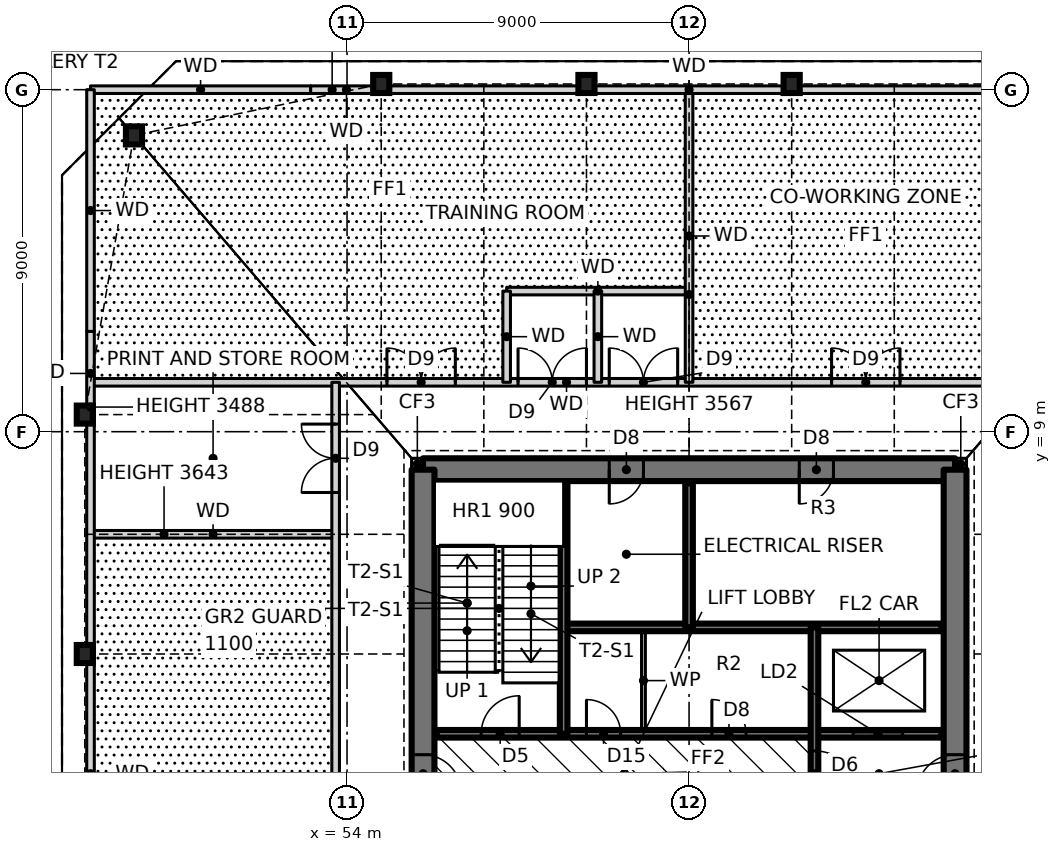
"""IFC4 building model, lengths in metres.
Left out: names, types, materials, properties, quantities, classifications, styles, units other than length and angle.
Written with IfcOpenShell. Run it as: python <this file> out.ifc"""

import sys

from ifc_helpers import new_model, si_unit, direction, frame, frame_2d, origin, origin_2d, place, context, subcontext, project, spatial, rectangle, i_section, extrude, element, fill, save


model = new_model("IFC4")
c1 = context("Model", 3, precision=1e-05, world=origin(), true_north=direction((0.0, 1.0)))
c2 = subcontext(c1, "Body", "Model", "MODEL_VIEW")
j1 = project(units=[si_unit("LENGTHUNIT", "METRE"), si_unit("PLANEANGLEUNIT", "RADIAN")], contexts=[c1])
p1 = place(None, origin())
s1 = spatial("IfcSite", under=j1, at=p1, CompositionType="ELEMENT")
p2 = place(p1, origin())
s2 = spatial("IfcBuilding", under=s1, at=p2, CompositionType="ELEMENT")
p3 = place(p2, frame((0.0, 0.0, 6.0)))
s3 = spatial("IfcBuildingStorey", under=s2, at=p3, CompositionType="ELEMENT", Elevation=6.0)
for number, where, z_axis, x_axis in (
    (1, (65.7, 18.15, 0.0), (0.0, 0.0, 1.0), (1.0, 0.0, 0.0)),
    (2, (60.3, 18.15, 0.0), (0.0, 0.0, 1.0), (1.0, 0.0, 0.0)),
    (3, (54.9, 18.15, 0.0), (0.0, 0.0, 1.0), (1.0, 0.0, 0.0)),
    (4, (48.394, 16.797, 0.0), (0.0, 0.0, 1.0), (1.0, 0.0, 0.0)),
    (5, (47.1, 9.45, 0.0), (0.0, 0.0, 1.0), (1.0, 0.0, 0.0)),
    (6, (47.1, 3.15, 0.0), (0.0, 0.0, 1.0), (1.0, 0.0, 0.0)),
):
    element("IfcColumn", number, at=place(p3, frame(where, z_axis=z_axis, x_axis=x_axis)), inside=s3, PredefinedType="COLUMN", context=c2, shape_type="SweptSolid", body=[
        extrude(i_section(OverallWidth=0.424, OverallDepth=0.475, WebThickness=0.048, FlangeThickness=0.077, at=origin_2d()), origin(), (0.0, 0.0, 1.0), 4.5),
    ])
for number, where, z_axis, x_axis in (
    (7, (70.0, 8.15, 0.0), (0.0, 0.0, 1.0), (1.0, 0.0, 0.0)),
    (8, (55.7, 8.15, 0.0), (0.0, 0.0, 1.0), (1.0, 0.0, 0.0)),
):
    element("IfcWall", number, at=place(p3, frame(where, z_axis=z_axis, x_axis=x_axis)), inside=s3, PredefinedType="SOLIDWALL", context=c2, shape_type="SweptSolid", body=[
        extrude(rectangle(XDim=0.3, YDim=0.3, at=frame_2d((0.15, 0.0))), origin(), (0.0, 0.0, 1.0), 4.5),
    ])
p4 = place(p3, frame((70.0, 8.0, 0.0), z_axis=(0.0, 0.0, 1.0), x_axis=(-1.0, 0.0, 0.0)))
e9 = element("IfcWall", 9, at=p4, inside=s3, PredefinedType="SHEAR", context=c2, shape_type="SweptSolid", body=[
    extrude(rectangle(XDim=14.0, YDim=0.6, at=frame_2d((7.0, 0.0))), origin(), (0.0, 0.0, 1.0), 4.5),
])
p5 = place(p4, frame((8.2, 0.0, 0.0)))
e10 = element("IfcOpeningElement", 10, at=p5, cuts=e9, PredefinedType="OPENING", context=c2, shape_type="SweptSolid", body=[
    extrude(rectangle(XDim=0.9, YDim=2.1, at=frame_2d((0.45, 1.05))), frame((0.0, 0.31, 0.0), z_axis=(0.0, -1.0, 0.0), x_axis=(1.0, 0.0, 0.0)), (0.0, 0.0, 1.0), 0.62),
])
p6 = place(p4, frame((3.2, 0.0, 0.0)))
e11 = element("IfcOpeningElement", 11, at=p6, cuts=e9, PredefinedType="OPENING", context=c2, shape_type="SweptSolid", body=[
    extrude(rectangle(XDim=0.9, YDim=2.1, at=frame_2d((0.45, 1.05))), frame((0.0, 0.31, 0.0), z_axis=(0.0, -1.0, 0.0), x_axis=(1.0, 0.0, 0.0)), (0.0, 0.0, 1.0), 0.62),
])
p7 = place(p3, frame((70.0, -8.0, 0.0), z_axis=(0.0, 0.0, 1.0), x_axis=(0.0, 1.0, 0.0)))
e12 = element("IfcWall", 12, at=p7, inside=s3, PredefinedType="SHEAR", context=c2, shape_type="SweptSolid", body=[
    extrude(rectangle(XDim=16.0, YDim=0.6, at=frame_2d((8.0, 0.0))), origin(), (0.0, 0.0, 1.0), 4.5),
])
p8 = place(p7, frame((7.5, 0.0, 0.0)))
e13 = element("IfcOpeningElement", 13, at=p8, cuts=e12, PredefinedType="OPENING", context=c2, shape_type="SweptSolid", body=[
    extrude(rectangle(XDim=1.0, YDim=2.1, at=frame_2d((0.5, 1.05))), frame((0.0, 0.31, 0.0), z_axis=(0.0, -1.0, 0.0), x_axis=(1.0, 0.0, 0.0)), (0.0, 0.0, 1.0), 0.62),
])
p9 = place(p3, frame((56.0, 8.0, 0.0), z_axis=(0.0, 0.0, 1.0), x_axis=(0.0, -1.0, 0.0)))
e14 = element("IfcWall", 14, at=p9, inside=s3, PredefinedType="SHEAR", context=c2, shape_type="SweptSolid", body=[
    extrude(rectangle(XDim=16.0, YDim=0.6, at=frame_2d((8.0, 0.0))), origin(), (0.0, 0.0, 1.0), 4.5),
])
p10 = place(p9, frame((7.5, 0.0, 0.0)))
e15 = element("IfcOpeningElement", 15, at=p10, cuts=e14, PredefinedType="OPENING", context=c2, shape_type="SweptSolid", body=[
    extrude(rectangle(XDim=1.0, YDim=2.1, at=frame_2d((0.5, 1.05))), frame((0.0, 0.31, 0.0), z_axis=(0.0, -1.0, 0.0), x_axis=(1.0, 0.0, 0.0)), (0.0, 0.0, 1.0), 0.62),
])
p11 = place(p3, frame((56.36, 1.05, 0.0), z_axis=(0.0, 0.0, 1.0), x_axis=(1.0, 0.0, 0.0)))
e16 = element("IfcWall", 16, at=p11, inside=s3, PredefinedType="SOLIDWALL", context=c2, shape_type="SweptSolid", body=[
    extrude(rectangle(XDim=13.28, YDim=0.2, at=frame_2d((6.64, 0.0))), origin(), (0.0, 0.0, 1.0), 4.5),
])
p12 = place(p11, frame((1.17, 0.0, 0.0)))
e17 = element("IfcOpeningElement", 17, at=p12, cuts=e16, PredefinedType="OPENING", context=c2, shape_type="SweptSolid", body=[
    extrude(rectangle(XDim=1.0, YDim=2.1, at=frame_2d((0.5, 1.05))), frame((0.0, 0.11, 0.0), z_axis=(0.0, -1.0, 0.0), x_axis=(1.0, 0.0, 0.0)), (0.0, 0.0, 1.0), 0.22),
])
p13 = place(p11, frame((7.24, 0.0, 0.0)))
e18 = element("IfcOpeningElement", 18, at=p13, cuts=e16, PredefinedType="OPENING", context=c2, shape_type="SweptSolid", body=[
    extrude(rectangle(XDim=0.9, YDim=2.1, at=frame_2d((0.45, 1.05))), frame((0.0, 0.11, 0.0), z_axis=(0.0, -1.0, 0.0), x_axis=(1.0, 0.0, 0.0)), (0.0, 0.0, 1.0), 0.22),
])
p14 = place(p11, frame((3.94, 0.0, 0.0)))
e19 = element("IfcOpeningElement", 19, at=p14, cuts=e16, PredefinedType="OPENING", context=c2, shape_type="SweptSolid", body=[
    extrude(rectangle(XDim=0.9, YDim=2.1, at=frame_2d((0.45, 1.05))), frame((0.0, 0.11, 0.0), z_axis=(0.0, -1.0, 0.0), x_axis=(1.0, 0.0, 0.0)), (0.0, 0.0, 1.0), 0.22),
])
p15 = place(p11, frame((10.96, 0.0, 0.0)))
e20 = element("IfcOpeningElement", 20, at=p15, cuts=e16, PredefinedType="OPENING", context=c2, shape_type="SweptSolid", body=[
    extrude(rectangle(XDim=1.3, YDim=2.1, at=frame_2d((0.65, 1.05))), frame((0.0, 0.11, 0.0), z_axis=(0.0, -1.0, 0.0), x_axis=(1.0, 0.0, 0.0)), (0.0, 0.0, 1.0), 0.22),
])
p16 = place(p3, frame((59.7, 3.85, 0.0), z_axis=(0.0, 0.0, 1.0), x_axis=(1.0, 0.0, 0.0)))
e21 = element("IfcWall", 21, at=p16, inside=s3, PredefinedType="SOLIDWALL", context=c2, shape_type="SweptSolid", body=[
    extrude(rectangle(XDim=9.94, YDim=0.2, at=frame_2d((4.97, 0.0))), origin(), (0.0, 0.0, 1.0), 4.5),
])
p17 = place(p3, frame((47.25, 6.3, 0.0), z_axis=(0.0, 0.0, 1.0), x_axis=(1.0, 0.0, 0.0)))
e22 = element("IfcWall", 22, at=p17, inside=s3, PredefinedType="SOLIDWALL", context=c2, shape_type="SweptSolid", body=[
    extrude(rectangle(XDim=6.45, YDim=0.2, at=frame_2d((3.225, 0.0))), origin(), (0.0, 0.0, 1.0), 3.643),
])
p18 = place(p3, frame((47.25, 10.3, 0.0), z_axis=(0.0, 0.0, 1.0), x_axis=(1.0, 0.0, 0.0)))
e23 = element("IfcWall", 23, at=p18, inside=s3, PredefinedType="SOLIDWALL", context=c2, shape_type="SweptSolid", body=[
    extrude(rectangle(XDim=25.05, YDim=0.2, at=frame_2d((12.525, 0.0))), origin(), (0.0, 0.0, 1.0), 4.25),
])
p19 = place(p18, frame((19.5, 0.0, 0.0)))
e24 = element("IfcOpeningElement", 24, at=p19, cuts=e23, PredefinedType="OPENING", context=c2, shape_type="SweptSolid", body=[
    extrude(rectangle(XDim=1.8, YDim=2.1, at=frame_2d((0.9, 1.05))), frame((0.0, 0.11, 0.0), z_axis=(0.0, -1.0, 0.0), x_axis=(1.0, 0.0, 0.0)), (0.0, 0.0, 1.0), 0.22),
])
p20 = place(p18, frame((13.65, 0.0, 0.0)))
e25 = element("IfcOpeningElement", 25, at=p20, cuts=e23, PredefinedType="OPENING", context=c2, shape_type="SweptSolid", body=[
    extrude(rectangle(XDim=1.8, YDim=2.1, at=frame_2d((0.9, 1.05))), frame((0.0, 0.11, 0.0), z_axis=(0.0, -1.0, 0.0), x_axis=(1.0, 0.0, 0.0)), (0.0, 0.0, 1.0), 0.22),
])
p21 = place(p18, frame((11.25, 0.0, 0.0)))
e26 = element("IfcOpeningElement", 26, at=p21, cuts=e23, PredefinedType="OPENING", context=c2, shape_type="SweptSolid", body=[
    extrude(rectangle(XDim=1.8, YDim=2.1, at=frame_2d((0.9, 1.05))), frame((0.0, 0.11, 0.0), z_axis=(0.0, -1.0, 0.0), x_axis=(1.0, 0.0, 0.0)), (0.0, 0.0, 1.0), 0.22),
])
p22 = place(p18, frame((7.8, 0.0, 0.0)))
e27 = element("IfcOpeningElement", 27, at=p22, cuts=e23, PredefinedType="OPENING", context=c2, shape_type="SweptSolid", body=[
    extrude(rectangle(XDim=1.8, YDim=2.1, at=frame_2d((0.9, 1.05))), frame((0.0, 0.11, 0.0), z_axis=(0.0, -1.0, 0.0), x_axis=(1.0, 0.0, 0.0)), (0.0, 0.0, 1.0), 0.22),
])
p23 = place(p3, frame((58.2, 12.7, 0.0), z_axis=(0.0, 0.0, 1.0), x_axis=(1.0, 0.0, 0.0)))
e28 = element("IfcWall", 28, at=p23, inside=s3, PredefinedType="SOLIDWALL", context=c2, shape_type="SweptSolid", body=[
    extrude(rectangle(XDim=4.8, YDim=0.2, at=frame_2d((2.4, 0.0))), origin(), (0.0, 0.0, 1.0), 4.25),
])
p24 = place(p3, frame((47.25, 18.0, 0.0), z_axis=(0.0, 0.0, 1.0), x_axis=(1.0, 0.0, 0.0)))
e29 = element("IfcWall", 29, at=p24, inside=s3, PredefinedType="SOLIDWALL", context=c2, shape_type="SweptSolid", body=[
    extrude(rectangle(XDim=5.793, YDim=0.2, at=frame_2d((2.896, 0.0))), origin(), (0.0, 0.0, 1.0), 4.25),
])
p25 = place(p3, frame((66.3, -7.64, 0.0), z_axis=(0.0, 0.0, 1.0), x_axis=(0.0, 1.0, 0.0)))
e30 = element("IfcWall", 30, at=p25, inside=s3, PredefinedType="SOLIDWALL", context=c2, shape_type="SweptSolid", body=[
    extrude(rectangle(XDim=11.49, YDim=0.2, at=frame_2d((5.745, 0.0))), origin(), (0.0, 0.0, 1.0), 4.5),
])
p26 = place(p25, frame((7.04, 0.0, 0.0)))
e31 = element("IfcOpeningElement", 31, at=p26, cuts=e30, PredefinedType="OPENING", context=c2, shape_type="SweptSolid", body=[
    extrude(rectangle(XDim=1.2, YDim=2.1, at=frame_2d((0.6, 1.05))), frame((0.0, 0.11, 0.0), z_axis=(0.0, -1.0, 0.0), x_axis=(1.0, 0.0, 0.0)), (0.0, 0.0, 1.0), 0.22),
])
p27 = place(p3, frame((63.0, 3.85, 0.0), z_axis=(0.0, 0.0, 1.0), x_axis=(0.0, 1.0, 0.0)))
e32 = element("IfcWall", 32, at=p27, inside=s3, PredefinedType="SOLIDWALL", context=c2, shape_type="SweptSolid", body=[
    extrude(rectangle(XDim=3.79, YDim=0.2, at=frame_2d((1.895, 0.0))), origin(), (0.0, 0.0, 1.0), 4.5),
])
p28 = place(p3, frame((63.0, 10.3, 0.0), z_axis=(0.0, 0.0, 1.0), x_axis=(0.0, 1.0, 0.0)))
e33 = element("IfcWall", 33, at=p28, inside=s3, PredefinedType="SOLIDWALL", context=c2, shape_type="SweptSolid", body=[
    extrude(rectangle(XDim=7.7, YDim=0.2, at=frame_2d((3.85, 0.0))), origin(), (0.0, 0.0, 1.0), 3.567),
])
p29 = place(p3, frame((61.8, 1.05, 0.0), z_axis=(0.0, 0.0, 1.0), x_axis=(0.0, 1.0, 0.0)))
e34 = element("IfcWall", 34, at=p29, inside=s3, PredefinedType="PARTITIONING", context=c2, shape_type="SweptSolid", body=[
    extrude(rectangle(XDim=2.8, YDim=0.1, at=frame_2d((1.4, 0.0))), origin(), (0.0, 0.0, 1.0), 4.3),
])
p30 = place(p3, frame((60.6, 10.3, 0.0), z_axis=(0.0, 0.0, 1.0), x_axis=(0.0, 1.0, 0.0)))
e35 = element("IfcWall", 35, at=p30, inside=s3, PredefinedType="SOLIDWALL", context=c2, shape_type="SweptSolid", body=[
    extrude(rectangle(XDim=2.4, YDim=0.2, at=frame_2d((1.2, 0.0))), origin(), (0.0, 0.0, 1.0), 4.25),
])
p31 = place(p3, frame((59.7, 1.05, 0.0), z_axis=(0.0, 0.0, 1.0), x_axis=(0.0, 1.0, 0.0)))
e36 = element("IfcWall", 36, at=p31, inside=s3, PredefinedType="SOLIDWALL", context=c2, shape_type="SweptSolid", body=[
    extrude(rectangle(XDim=6.59, YDim=0.2, at=frame_2d((3.295, 0.0))), origin(), (0.0, 0.0, 1.0), 4.5),
])
p32 = place(p3, frame((58.2, 10.3, 0.0), z_axis=(0.0, 0.0, 1.0), x_axis=(0.0, 1.0, 0.0)))
e37 = element("IfcWall", 37, at=p32, inside=s3, PredefinedType="SOLIDWALL", context=c2, shape_type="SweptSolid", body=[
    extrude(rectangle(XDim=2.4, YDim=0.2, at=frame_2d((1.2, 0.0))), origin(), (0.0, 0.0, 1.0), 4.25),
])
p33 = place(p3, frame((53.7, -18.0, 0.0), z_axis=(0.0, 0.0, 1.0), x_axis=(0.0, 1.0, 0.0)))
e38 = element("IfcWall", 38, at=p33, inside=s3, PredefinedType="SOLIDWALL", context=c2, shape_type="SweptSolid", body=[
    extrude(rectangle(XDim=28.3, YDim=0.2, at=frame_2d((14.15, 0.0))), origin(), (0.0, 0.0, 1.0), 4.25),
])
p34 = place(p33, frame((15.4, 0.0, 0.0)))
e39 = element("IfcOpeningElement", 39, at=p34, cuts=e38, PredefinedType="OPENING", context=c2, shape_type="SweptSolid", body=[
    extrude(rectangle(XDim=1.8, YDim=2.1, at=frame_2d((0.9, 1.05))), frame((0.0, 0.11, 0.0), z_axis=(0.0, -1.0, 0.0), x_axis=(1.0, 0.0, 0.0)), (0.0, 0.0, 1.0), 0.22),
])
p35 = place(p33, frame((25.4, 0.0, 0.0)))
e40 = element("IfcOpeningElement", 40, at=p35, cuts=e38, PredefinedType="OPENING", context=c2, shape_type="SweptSolid", body=[
    extrude(rectangle(XDim=1.8, YDim=2.1, at=frame_2d((0.9, 1.05))), frame((0.0, 0.11, 0.0), z_axis=(0.0, -1.0, 0.0), x_axis=(1.0, 0.0, 0.0)), (0.0, 0.0, 1.0), 0.22),
])
p36 = place(p33, frame((8.55, 0.0, 0.0)))
e41 = element("IfcOpeningElement", 41, at=p36, cuts=e38, PredefinedType="OPENING", context=c2, shape_type="SweptSolid", body=[
    extrude(rectangle(XDim=1.8, YDim=2.1, at=frame_2d((0.9, 1.05))), frame((0.0, 0.11, 0.0), z_axis=(0.0, -1.0, 0.0), x_axis=(1.0, 0.0, 0.0)), (0.0, 0.0, 1.0), 0.22),
])
p37 = place(p3, frame((53.043, 18.0, 0.0), z_axis=(0.0, 0.0, 1.0), x_axis=(1.0, 0.0, 0.0)))
e42 = element("IfcWall", 42, at=p37, inside=s3, PredefinedType="SOLIDWALL", context=c2, shape_type="SweptSolid", body=[
    extrude(rectangle(XDim=1.884, YDim=0.2, at=frame_2d((0.942, 0.0))), origin(), (0.0, 0.0, 1.0), 3.488),
])
p38 = place(p3, frame((54.927, 18.0, 0.0), z_axis=(0.0, 0.0, 1.0), x_axis=(1.0, 0.0, 0.0)))
e43 = element("IfcWall", 43, at=p38, inside=s3, PredefinedType="SOLIDWALL", context=c2, shape_type="SweptSolid", body=[
    extrude(rectangle(XDim=16.146, YDim=0.2, at=frame_2d((8.073, 0.0))), origin(), (0.0, 0.0, 1.0), 4.25),
])
p39 = place(p3, frame((47.25, -9.427, 0.0), z_axis=(0.0, 0.0, 1.0), x_axis=(0.0, 1.0, 0.0)))
e44 = element("IfcWall", 44, at=p39, inside=s3, PredefinedType="SOLIDWALL", context=c2, shape_type="SweptSolid", body=[
    extrude(rectangle(XDim=18.854, YDim=0.2, at=frame_2d((9.427, 0.0))), origin(), (0.0, 0.0, 1.0), 4.25),
])
p40 = place(p3, frame((47.25, 9.427, 0.0), z_axis=(0.0, 0.0, 1.0), x_axis=(0.0, 1.0, 0.0)))
e45 = element("IfcWall", 45, at=p40, inside=s3, PredefinedType="SOLIDWALL", context=c2, shape_type="SweptSolid", body=[
    extrude(rectangle(XDim=2.212, YDim=0.2, at=frame_2d((1.106, 0.0))), origin(), (0.0, 0.0, 1.0), 3.488),
])
p41 = place(p3, frame((47.25, 11.639, 0.0), z_axis=(0.0, 0.0, 1.0), x_axis=(0.0, 1.0, 0.0)))
e46 = element("IfcWall", 46, at=p41, inside=s3, PredefinedType="SOLIDWALL", context=c2, shape_type="SweptSolid", body=[
    extrude(rectangle(XDim=6.361, YDim=0.2, at=frame_2d((3.181, 0.0))), origin(), (0.0, 0.0, 1.0), 4.25),
])
p42 = place(p12, origin())
e47 = element("IfcDoor", 47, at=p42, inside=s3, OperationType="SINGLE_SWING_RIGHT", PredefinedType="DOOR", context=c2, shape_type="SweptSolid", body=[
    extrude(rectangle(XDim=1.0, YDim=2.1, at=frame_2d((0.5, 1.05))), frame((0.0, 0.025, 0.0), z_axis=(0.0, -1.0, 0.0), x_axis=(1.0, 0.0, 0.0)), (0.0, 0.0, 1.0), 0.05),
])
fill(e17, e47)
p43 = place(p26, frame((1.2, 0.0, 0.0), z_axis=(0.0, 0.0, 1.0), x_axis=(-1.0, 0.0, 0.0)))
e48 = element("IfcDoor", 48, at=p43, inside=s3, OperationType="SINGLE_SWING_RIGHT", PredefinedType="DOOR", context=c2, shape_type="SweptSolid", body=[
    extrude(rectangle(XDim=1.2, YDim=2.1, at=frame_2d((0.6, 1.05))), frame((0.0, 0.025, 0.0), z_axis=(0.0, -1.0, 0.0), x_axis=(1.0, 0.0, 0.0)), (0.0, 0.0, 1.0), 0.05),
])
fill(e31, e48)
p44 = place(p13, origin())
e49 = element("IfcDoor", 49, at=p44, inside=s3, OperationType="SINGLE_SWING_LEFT", PredefinedType="DOOR", context=c2, shape_type="SweptSolid", body=[
    extrude(rectangle(XDim=0.9, YDim=2.1, at=frame_2d((0.45, 1.05))), frame((0.0, 0.025, 0.0), z_axis=(0.0, -1.0, 0.0), x_axis=(1.0, 0.0, 0.0)), (0.0, 0.0, 1.0), 0.05),
])
fill(e18, e49)
p45 = place(p14, origin())
e50 = element("IfcDoor", 50, at=p45, inside=s3, OperationType="SINGLE_SWING_LEFT", PredefinedType="DOOR", context=c2, shape_type="SweptSolid", body=[
    extrude(rectangle(XDim=0.9, YDim=2.1, at=frame_2d((0.45, 1.05))), frame((0.0, 0.025, 0.0), z_axis=(0.0, -1.0, 0.0), x_axis=(1.0, 0.0, 0.0)), (0.0, 0.0, 1.0), 0.05),
])
fill(e19, e50)
p46 = place(p19, origin())
e51 = element("IfcDoor", 51, at=p46, inside=s3, OperationType="DOUBLE_DOOR_SINGLE_SWING", PredefinedType="DOOR", context=c2, shape_type="SweptSolid", body=[
    extrude(rectangle(XDim=1.8, YDim=2.1, at=frame_2d((0.9, 1.05))), frame((0.0, 0.025, 0.0), z_axis=(0.0, -1.0, 0.0), x_axis=(1.0, 0.0, 0.0)), (0.0, 0.0, 1.0), 0.05),
])
fill(e24, e51)
p47 = place(p20, origin())
e52 = element("IfcDoor", 52, at=p47, inside=s3, OperationType="DOUBLE_DOOR_SINGLE_SWING", PredefinedType="DOOR", context=c2, shape_type="SweptSolid", body=[
    extrude(rectangle(XDim=1.8, YDim=2.1, at=frame_2d((0.9, 1.05))), frame((0.0, 0.025, 0.0), z_axis=(0.0, -1.0, 0.0), x_axis=(1.0, 0.0, 0.0)), (0.0, 0.0, 1.0), 0.05),
])
fill(e25, e52)
p48 = place(p21, origin())
e53 = element("IfcDoor", 53, at=p48, inside=s3, OperationType="DOUBLE_DOOR_SINGLE_SWING", PredefinedType="DOOR", context=c2, shape_type="SweptSolid", body=[
    extrude(rectangle(XDim=1.8, YDim=2.1, at=frame_2d((0.9, 1.05))), frame((0.0, 0.025, 0.0), z_axis=(0.0, -1.0, 0.0), x_axis=(1.0, 0.0, 0.0)), (0.0, 0.0, 1.0), 0.05),
])
fill(e26, e53)
p49 = place(p22, origin())
e54 = element("IfcDoor", 54, at=p49, inside=s3, OperationType="DOUBLE_DOOR_SINGLE_SWING", PredefinedType="DOOR", context=c2, shape_type="SweptSolid", body=[
    extrude(rectangle(XDim=1.8, YDim=2.1, at=frame_2d((0.9, 1.05))), frame((0.0, 0.025, 0.0), z_axis=(0.0, -1.0, 0.0), x_axis=(1.0, 0.0, 0.0)), (0.0, 0.0, 1.0), 0.05),
])
fill(e27, e54)
p50 = place(p35, origin())
e55 = element("IfcDoor", 55, at=p50, inside=s3, OperationType="DOUBLE_DOOR_SINGLE_SWING", PredefinedType="DOOR", context=c2, shape_type="SweptSolid", body=[
    extrude(rectangle(XDim=1.8, YDim=2.1, at=frame_2d((0.9, 1.05))), frame((0.0, 0.025, 0.0), z_axis=(0.0, -1.0, 0.0), x_axis=(1.0, 0.0, 0.0)), (0.0, 0.0, 1.0), 0.05),
])
fill(e40, e55)
p51 = place(p10, origin())
e56 = element("IfcDoor", 56, at=p51, inside=s3, OperationType="SINGLE_SWING_RIGHT", PredefinedType="DOOR", context=c2, shape_type="SweptSolid", body=[
    extrude(rectangle(XDim=1.0, YDim=2.1, at=frame_2d((0.5, 1.05))), frame((0.0, 0.025, 0.0), z_axis=(0.0, -1.0, 0.0), x_axis=(1.0, 0.0, 0.0)), (0.0, 0.0, 1.0), 0.05),
])
fill(e15, e56)
p52 = place(p8, origin())
e57 = element("IfcDoor", 57, at=p52, inside=s3, OperationType="SINGLE_SWING_LEFT", PredefinedType="DOOR", context=c2, shape_type="SweptSolid", body=[
    extrude(rectangle(XDim=1.0, YDim=2.1, at=frame_2d((0.5, 1.05))), frame((0.0, 0.025, 0.0), z_axis=(0.0, -1.0, 0.0), x_axis=(1.0, 0.0, 0.0)), (0.0, 0.0, 1.0), 0.05),
])
fill(e13, e57)
p53 = place(p5, origin())
e58 = element("IfcDoor", 58, at=p53, inside=s3, OperationType="SINGLE_SWING_RIGHT", PredefinedType="DOOR", context=c2, shape_type="SweptSolid", body=[
    extrude(rectangle(XDim=0.9, YDim=2.1, at=frame_2d((0.45, 1.05))), frame((0.0, 0.025, 0.0), z_axis=(0.0, -1.0, 0.0), x_axis=(1.0, 0.0, 0.0)), (0.0, 0.0, 1.0), 0.05),
])
fill(e10, e58)
p54 = place(p6, origin())
e59 = element("IfcDoor", 59, at=p54, inside=s3, OperationType="SINGLE_SWING_RIGHT", PredefinedType="DOOR", context=c2, shape_type="SweptSolid", body=[
    extrude(rectangle(XDim=0.9, YDim=2.1, at=frame_2d((0.45, 1.05))), frame((0.0, 0.025, 0.0), z_axis=(0.0, -1.0, 0.0), x_axis=(1.0, 0.0, 0.0)), (0.0, 0.0, 1.0), 0.05),
])
fill(e11, e59)
p55 = place(p15, origin())
e60 = element("IfcDoor", 60, at=p55, inside=s3, OperationType="SLIDING_TO_LEFT", PredefinedType="DOOR", context=c2, shape_type="SweptSolid", body=[
    extrude(rectangle(XDim=1.3, YDim=2.1, at=frame_2d((0.65, 1.05))), frame((0.0, 0.025, 0.0), z_axis=(0.0, -1.0, 0.0), x_axis=(1.0, 0.0, 0.0)), (0.0, 0.0, 1.0), 0.05),
])
fill(e20, e60)
save(model, sys.argv[1])
